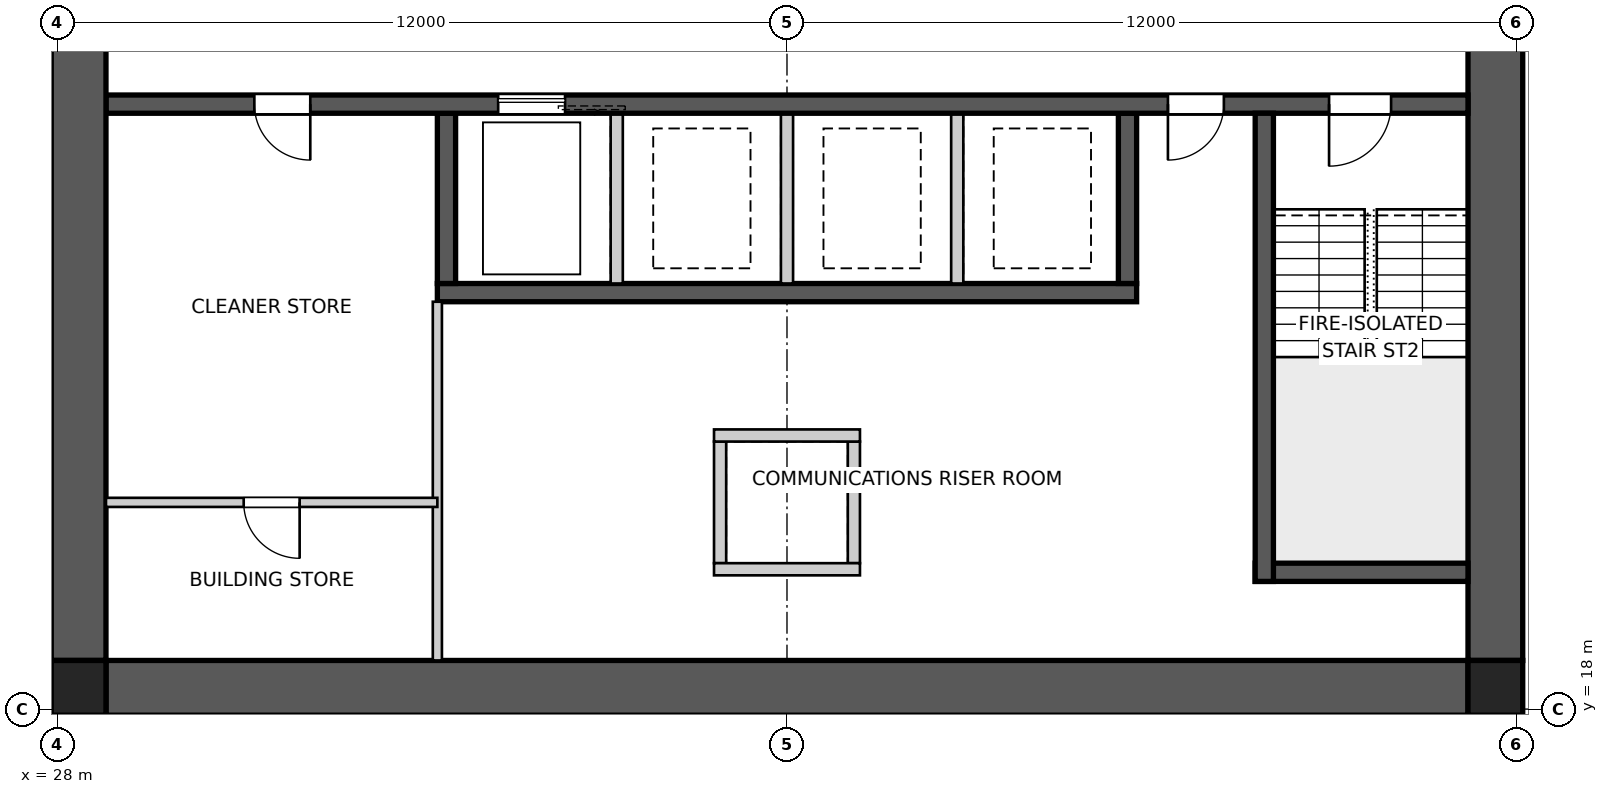
"""IFC4 building model, lengths in metres.
Left out: names, types, materials, properties, quantities, classifications, styles, units other than length and angle.
Written with IfcOpenShell. Run it as: python <this file> out.ifc"""

import sys

from ifc_helpers import new_model, si_unit, direction, frame, frame_2d, origin, origin_2d, place, context, subcontext, project, spatial, polyline, rectangle, outline, extrude, element, fill, save


model = new_model("IFC4")
c1 = context("Model", 3, precision=1e-05, world=origin(), true_north=direction((0.0, 1.0)))
c2 = subcontext(c1, "Body", "Model", "MODEL_VIEW")
j1 = project(units=[si_unit("LENGTHUNIT", "METRE"), si_unit("PLANEANGLEUNIT", "RADIAN")], contexts=[c1])
p1 = place(None, origin())
s1 = spatial("IfcSite", under=j1, at=p1, CompositionType="ELEMENT")
p2 = place(p1, origin())
s2 = spatial("IfcBuilding", under=s1, at=p2, CompositionType="ELEMENT")
p3 = place(p2, frame((0.0, 0.0, 18.4)))
s3 = spatial("IfcBuildingStorey", under=s2, at=p3, CompositionType="ELEMENT", Elevation=18.4)
p4 = place(p3, frame((51.2, 18.35, 0.0), z_axis=(0.0, 0.0, 1.0), x_axis=(-1.0, 0.0, 0.0)))
e1 = element("IfcWall", 1, at=p4, inside=s3, PredefinedType="SHEAR", context=c2, shape_type="SweptSolid", body=[
    extrude(outline(polyline([(0.0, -0.45), (22.4, -0.45), (22.4, -0.025), (22.85, -0.025), (22.85, 0.025), (22.4, 0.025), (22.4, 0.45), (0.0, 0.45), (0.0, 0.025), (-0.45, 0.025), (-0.45, -0.025), (0.0, -0.025), (0.0, -0.45)])), origin(), (0.0, 0.0, 1.0), 3.4),
])
p5 = place(p3, frame((51.65, 18.8, 0.0), z_axis=(0.0, 0.0, 1.0), x_axis=(0.0, 1.0, 0.0)))
e2 = element("IfcWall", 2, at=p5, inside=s3, PredefinedType="SHEAR", context=c2, shape_type="SweptSolid", body=[
    extrude(outline(polyline([(0.0, -0.45), (22.4, -0.45), (22.4, -0.025), (22.85, -0.025), (22.85, 0.025), (22.4, 0.025), (22.4, 0.45), (0.0, 0.45), (0.0, 0.025), (-0.45, 0.025), (-0.45, -0.025), (0.0, -0.025), (0.0, -0.45)])), origin(), (0.0, 0.0, 1.0), 3.4),
])
p6 = place(p5, frame((11.14, 0.0, 0.0)))
e3 = element("IfcOpeningElement", 3, at=p6, cuts=e2, PredefinedType="OPENING", context=c2, shape_type="SweptSolid", body=[
    extrude(rectangle(XDim=1.02, YDim=2.4, at=frame_2d((0.51, 1.2))), frame((0.0, 0.46, 0.0), z_axis=(0.0, -1.0, 0.0), x_axis=(1.0, 0.0, 0.0)), (0.0, 0.0, 1.0), 0.92),
])
p7 = place(p3, frame((28.35, 41.2, 0.0), z_axis=(0.0, 0.0, 1.0), x_axis=(0.0, -1.0, 0.0)))
e4 = element("IfcWall", 4, at=p7, inside=s3, PredefinedType="SHEAR", context=c2, shape_type="SweptSolid", body=[
    extrude(outline(polyline([(0.0, -0.45), (22.4, -0.45), (22.4, -0.025), (22.85, -0.025), (22.85, 0.025), (22.4, 0.025), (22.4, 0.45), (0.0, 0.45), (0.0, 0.025), (-0.45, 0.025), (-0.45, -0.025), (0.0, -0.025), (0.0, -0.45)])), origin(), (0.0, 0.0, 1.0), 3.4),
])
p8 = place(p7, frame((11.14, 0.0, 0.0)))
e5 = element("IfcOpeningElement", 5, at=p8, cuts=e4, PredefinedType="OPENING", context=c2, shape_type="SweptSolid", body=[
    extrude(rectangle(XDim=1.02, YDim=2.4, at=frame_2d((0.51, 1.2))), frame((0.0, 0.46, 0.0), z_axis=(0.0, -1.0, 0.0), x_axis=(1.0, 0.0, 0.0)), (0.0, 0.0, 1.0), 0.92),
])
p9 = place(p3, frame((51.2, 27.95, 0.0), z_axis=(0.0, 0.0, 1.0), x_axis=(-1.0, 0.0, 0.0)))
e6 = element("IfcWall", 6, at=p9, inside=s3, PredefinedType="SHEAR", context=c2, shape_type="SweptSolid", body=[
    extrude(rectangle(XDim=22.4, YDim=0.3, at=frame_2d((11.2, 0.0))), origin(), (0.0, 0.0, 1.0), 3.4),
])
p10 = place(p9, frame((19.04, 0.0, 0.0)))
e7 = element("IfcOpeningElement", 7, at=p10, cuts=e6, PredefinedType="OPENING", context=c2, shape_type="SweptSolid", body=[
    extrude(rectangle(XDim=0.92, YDim=2.1, at=frame_2d((0.46, 1.05))), frame((0.0, 0.16, 0.0), z_axis=(0.0, -1.0, 0.0), x_axis=(1.0, 0.0, 0.0)), (0.0, 0.0, 1.0), 0.32),
])
p11 = place(p9, frame((1.265, 0.0, 0.0)))
e8 = element("IfcOpeningElement", 8, at=p11, cuts=e6, PredefinedType="OPENING", context=c2, shape_type="SweptSolid", body=[
    extrude(rectangle(XDim=1.02, YDim=2.1, at=frame_2d((0.51, 1.05))), frame((0.0, 0.16, 0.0), z_axis=(0.0, -1.0, 0.0), x_axis=(1.0, 0.0, 0.0)), (0.0, 0.0, 1.0), 0.32),
])
p12 = place(p9, frame((4.015, 0.0, 0.0)))
e9 = element("IfcOpeningElement", 9, at=p12, cuts=e6, PredefinedType="OPENING", context=c2, shape_type="SweptSolid", body=[
    extrude(rectangle(XDim=0.92, YDim=2.1, at=frame_2d((0.46, 1.05))), frame((0.0, 0.16, 0.0), z_axis=(0.0, -1.0, 0.0), x_axis=(1.0, 0.0, 0.0)), (0.0, 0.0, 1.0), 0.32),
])
p13 = place(p9, frame((14.85, 0.0, 0.0)))
e10 = element("IfcOpeningElement", 10, at=p13, cuts=e6, PredefinedType="OPENING", context=c2, shape_type="SweptSolid", body=[
    extrude(rectangle(XDim=1.1, YDim=2.1, at=frame_2d((0.55, 1.05))), frame((0.0, 0.16, 0.0), z_axis=(0.0, -1.0, 0.0), x_axis=(1.0, 0.0, 0.0)), (0.0, 0.0, 1.0), 0.32),
])
p14 = place(p3, frame((45.75, 24.85, 0.0), z_axis=(0.0, 0.0, 1.0), x_axis=(-1.0, 0.0, 0.0)))
e11 = element("IfcWall", 11, at=p14, inside=s3, PredefinedType="SHEAR", context=c2, shape_type="SweptSolid", body=[
    extrude(rectangle(XDim=11.5, YDim=0.3, at=frame_2d((5.75, 0.0))), origin(), (0.0, 0.0, 1.0), 3.4),
])
p15 = place(p3, frame((45.6, 27.8, 0.0), z_axis=(0.0, 0.0, 1.0), x_axis=(0.0, -1.0, 0.0)))
e12 = element("IfcWall", 12, at=p15, inside=s3, PredefinedType="SHEAR", context=c2, shape_type="SweptSolid", body=[
    extrude(rectangle(XDim=2.8, YDim=0.3, at=frame_2d((1.4, 0.0))), origin(), (0.0, 0.0, 1.0), 3.4),
])
for number, where, z_axis, x_axis in (
    (13, (42.8, 27.8, 0.0), (0.0, 0.0, 1.0), (0.0, -1.0, 0.0)),
    (14, (40.0, 27.8, 0.0), (0.0, 0.0, 1.0), (0.0, -1.0, 0.0)),
    (15, (37.2, 27.8, 0.0), (0.0, 0.0, 1.0), (0.0, -1.0, 0.0)),
):
    element("IfcWall", number, at=place(p3, frame(where, z_axis=z_axis, x_axis=x_axis)), inside=s3, PredefinedType="SOLIDWALL", context=c2, shape_type="SweptSolid", body=[
        extrude(rectangle(XDim=2.8, YDim=0.2, at=frame_2d((1.4, 0.0))), origin(), (0.0, 0.0, 1.0), 3.4),
    ])
p16 = place(p3, frame((34.4, 27.8, 0.0), z_axis=(0.0, 0.0, 1.0), x_axis=(0.0, -1.0, 0.0)))
e16 = element("IfcWall", 16, at=p16, inside=s3, PredefinedType="SHEAR", context=c2, shape_type="SweptSolid", body=[
    extrude(rectangle(XDim=2.8, YDim=0.3, at=frame_2d((1.4, 0.0))), origin(), (0.0, 0.0, 1.0), 3.4),
])
p17 = place(p3, frame((47.85, 27.8, 0.0), z_axis=(0.0, 0.0, 1.0), x_axis=(0.0, -1.0, 0.0)))
e17 = element("IfcWall", 17, at=p17, inside=s3, PredefinedType="SHEAR", context=c2, shape_type="SweptSolid", body=[
    extrude(rectangle(XDim=7.7, YDim=0.3, at=frame_2d((3.85, 0.0))), origin(), (0.0, 0.0, 1.0), 3.4),
])
p18 = place(p3, frame((51.2, 20.25, 0.0), z_axis=(0.0, 0.0, 1.0), x_axis=(-1.0, 0.0, 0.0)))
e18 = element("IfcWall", 18, at=p18, inside=s3, PredefinedType="SHEAR", context=c2, shape_type="SweptSolid", body=[
    extrude(rectangle(XDim=3.5, YDim=0.3, at=frame_2d((1.75, 0.0))), origin(), (0.0, 0.0, 1.0), 3.4),
])
for number, where, z_axis, x_axis in (
    (19, (38.9, 22.4, 0.0), (0.0, 0.0, 1.0), (0.0, -1.0, 0.0)),
    (20, (41.1, 22.4, 0.0), (0.0, 0.0, 1.0), (0.0, -1.0, 0.0)),
):
    element("IfcWall", number, at=place(p3, frame(where, z_axis=z_axis, x_axis=x_axis)), inside=s3, PredefinedType="SOLIDWALL", context=c2, shape_type="SweptSolid", body=[
        extrude(rectangle(XDim=2.0, YDim=0.2, at=frame_2d((1.0, 0.0))), origin(), (0.0, 0.0, 1.0), 3.4),
    ])
for number, where, z_axis, x_axis in (
    (21, (38.8, 22.5, 0.0), (0.0, 0.0, 1.0), (1.0, 0.0, 0.0)),
    (22, (38.8, 20.3, 0.0), (0.0, 0.0, 1.0), (1.0, 0.0, 0.0)),
):
    element("IfcWall", number, at=place(p3, frame(where, z_axis=z_axis, x_axis=x_axis)), inside=s3, PredefinedType="SOLIDWALL", context=c2, shape_type="SweptSolid", body=[
        extrude(rectangle(XDim=2.4, YDim=0.2, at=frame_2d((1.2, 0.0))), origin(), (0.0, 0.0, 1.0), 3.4),
    ])
for number, where, z_axis, x_axis in (
    (23, (28.35, 18.35, 0.0), (0.0, 0.0, 1.0), (1.0, 0.0, 0.0)),
    (24, (51.65, 18.35, 0.0), (0.0, 0.0, 1.0), (1.0, 0.0, 0.0)),
):
    element("IfcColumn", number, at=place(p3, frame(where, z_axis=z_axis, x_axis=x_axis)), inside=s3, PredefinedType="COLUMN", context=c2, shape_type="SweptSolid", body=[
        extrude(rectangle(XDim=0.9, YDim=0.9, at=origin_2d()), origin(), (0.0, 0.0, 1.0), 3.4),
    ])
p19 = place(p3, frame((34.25, 18.8, 0.0), z_axis=(0.0, 0.0, 1.0), x_axis=(0.0, 1.0, 0.0)))
e25 = element("IfcWall", 25, at=p19, inside=s3, PredefinedType="SOLIDWALL", context=c2, shape_type="SweptSolid", body=[
    extrude(rectangle(XDim=5.9, YDim=0.15, at=frame_2d((2.95, 0.0))), origin(), (0.0, 0.0, 1.0), 3.25),
])
p20 = place(p3, frame((34.25, 21.4, 0.0), z_axis=(0.0, 0.0, 1.0), x_axis=(-1.0, 0.0, 0.0)))
e26 = element("IfcWall", 26, at=p20, inside=s3, PredefinedType="SOLIDWALL", context=c2, shape_type="SweptSolid", body=[
    extrude(rectangle(XDim=5.45, YDim=0.15, at=frame_2d((2.725, 0.0))), origin(), (0.0, 0.0, 1.0), 3.25),
])
p21 = place(p20, frame((2.265, 0.0, 0.0)))
e27 = element("IfcOpeningElement", 27, at=p21, cuts=e26, PredefinedType="OPENING", context=c2, shape_type="SweptSolid", body=[
    extrude(rectangle(XDim=0.92, YDim=2.1, at=frame_2d((0.46, 1.05))), frame((0.0, 0.085, 0.0), z_axis=(0.0, -1.0, 0.0), x_axis=(1.0, 0.0, 0.0)), (0.0, 0.0, 1.0), 0.17),
])
p22 = place(p10, origin())
e28 = element("IfcDoor", 28, at=p22, inside=s3, OperationType="SINGLE_SWING_LEFT", PredefinedType="DOOR", context=c2, shape_type="SweptSolid", body=[
    extrude(rectangle(XDim=0.92, YDim=2.1, at=frame_2d((0.46, 1.05))), frame((0.0, 0.025, 0.0), z_axis=(0.0, -1.0, 0.0), x_axis=(1.0, 0.0, 0.0)), (0.0, 0.0, 1.0), 0.05),
])
fill(e7, e28)
p23 = place(p11, origin())
e29 = element("IfcDoor", 29, at=p23, inside=s3, OperationType="SINGLE_SWING_RIGHT", PredefinedType="DOOR", context=c2, shape_type="SweptSolid", body=[
    extrude(rectangle(XDim=1.02, YDim=2.1, at=frame_2d((0.51, 1.05))), frame((0.0, 0.025, 0.0), z_axis=(0.0, -1.0, 0.0), x_axis=(1.0, 0.0, 0.0)), (0.0, 0.0, 1.0), 0.05),
])
fill(e8, e29)
p24 = place(p12, origin())
e30 = element("IfcDoor", 30, at=p24, inside=s3, OperationType="SINGLE_SWING_RIGHT", PredefinedType="DOOR", context=c2, shape_type="SweptSolid", body=[
    extrude(rectangle(XDim=0.92, YDim=2.1, at=frame_2d((0.46, 1.05))), frame((0.0, 0.025, 0.0), z_axis=(0.0, -1.0, 0.0), x_axis=(1.0, 0.0, 0.0)), (0.0, 0.0, 1.0), 0.05),
])
fill(e9, e30)
p25 = place(p21, origin())
e31 = element("IfcDoor", 31, at=p25, inside=s3, OperationType="SINGLE_SWING_LEFT", PredefinedType="DOOR", context=c2, shape_type="SweptSolid", body=[
    extrude(rectangle(XDim=0.92, YDim=2.1, at=frame_2d((0.46, 1.05))), frame((0.0, 0.025, 0.0), z_axis=(0.0, -1.0, 0.0), x_axis=(1.0, 0.0, 0.0)), (0.0, 0.0, 1.0), 0.05),
])
fill(e27, e31)
p26 = place(p13, origin())
e32 = element("IfcDoor", 32, at=p26, inside=s3, OperationType="SLIDING_TO_LEFT", PredefinedType="DOOR", context=c2, shape_type="SweptSolid", body=[
    extrude(rectangle(XDim=1.1, YDim=2.1, at=frame_2d((0.55, 1.05))), frame((0.0, 0.025, 0.0), z_axis=(0.0, -1.0, 0.0), x_axis=(1.0, 0.0, 0.0)), (0.0, 0.0, 1.0), 0.05),
])
fill(e10, e32)
save(model, sys.argv[1])
